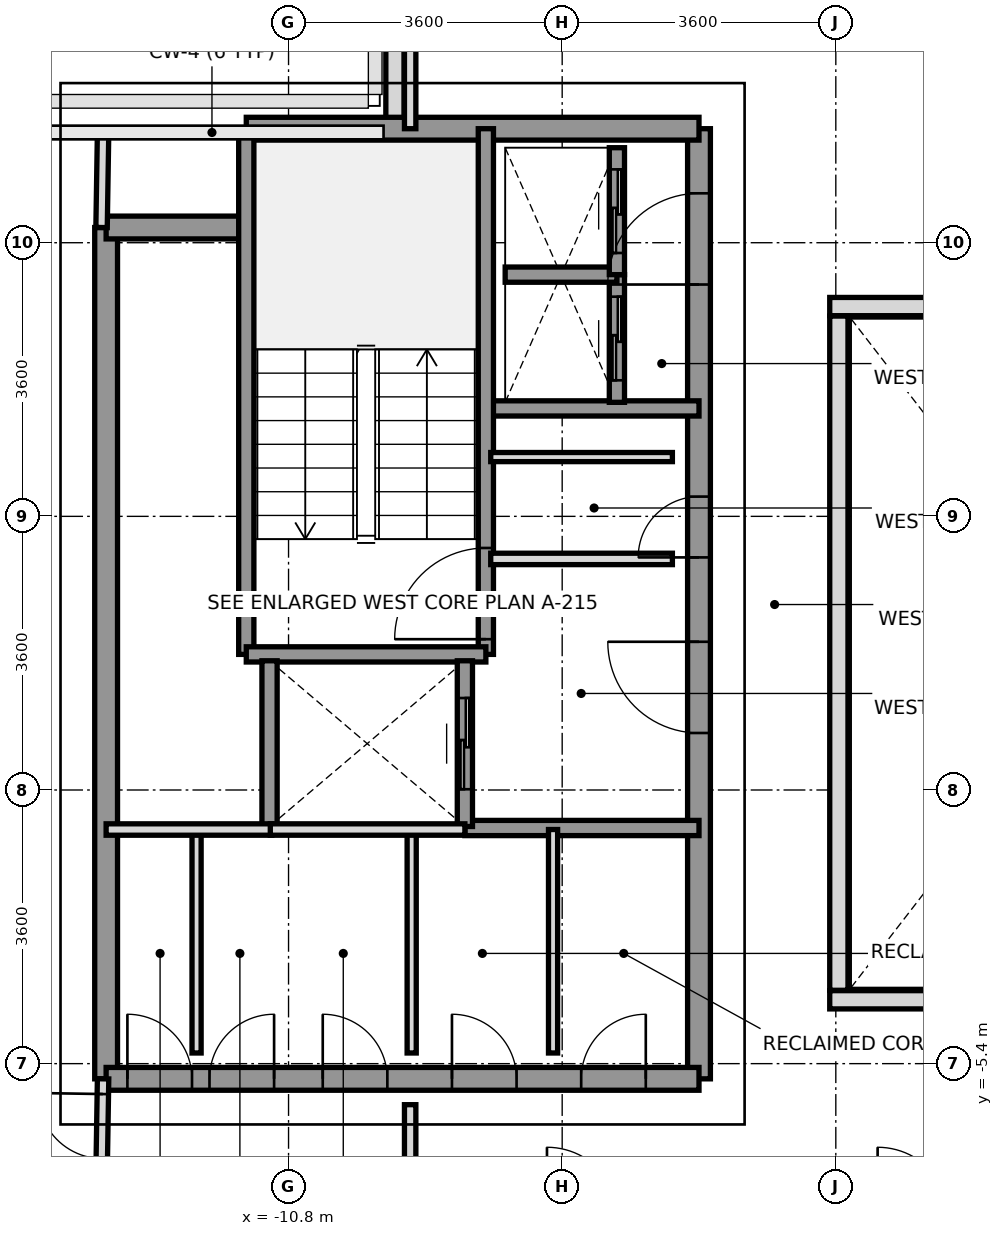
"""IFC4 building model, lengths in metres.
Left out: names, types, materials, properties, quantities, classifications, styles, units other than length and angle.
Written with IfcOpenShell. Run it as: python <this file> out.ifc"""

import sys

from ifc_helpers import new_model, si_unit, direction, frame, frame_2d, origin, place, context, subcontext, project, spatial, rectangle, extrude, source, transform, mapped, element, fill, save


model = new_model("IFC4")
c1 = context("Model", 3, precision=1e-05, world=origin(), true_north=direction((0.0, 1.0)))
c2 = subcontext(c1, "Body", "Model", "MODEL_VIEW")
j1 = project(units=[si_unit("LENGTHUNIT", "METRE"), si_unit("PLANEANGLEUNIT", "RADIAN")], contexts=[c1])
p1 = place(None, origin())
s1 = spatial("IfcSite", under=j1, at=p1, CompositionType="ELEMENT")
p2 = place(p1, origin())
s2 = spatial("IfcBuilding", under=s1, at=p2, CompositionType="ELEMENT")
p3 = place(p2, frame((0.0, 0.0, 230.0)))
s3 = spatial("IfcBuildingStorey", under=s2, at=p3, CompositionType="ELEMENT", Elevation=230.0)
p4 = place(p3, frame((-9.4, 6.953, 0.0), z_axis=(0.0, 0.0, 1.0), x_axis=(0.0, 1.0, 0.0)))
e1 = element("IfcWall", 1, at=p4, inside=s3, PredefinedType="PARAPET", context=c2, shape_type="SweptSolid", body=[
    extrude(rectangle(XDim=1.669, YDim=0.24, at=frame_2d((0.834, 0.0))), origin(), (0.0, 0.0, 1.0), 1.15),
])
p5 = place(p3, frame((-13.2, -5.6, 0.0), z_axis=(0.0, 0.0, 1.0), x_axis=(0.0, 1.0, 0.0)))
e2 = element("IfcWall", 2, at=p5, inside=s3, PredefinedType="SHEAR", context=c2, shape_type="SweptSolid", body=[
    extrude(rectangle(XDim=11.2, YDim=0.3, at=frame_2d((5.6, 0.0))), origin(), (0.0, 0.0, 1.0), 3.01),
])
p6 = place(p3, frame((-5.4, -5.6, 0.0), z_axis=(0.0, 0.0, 1.0), x_axis=(0.0, 1.0, 0.0)))
e3 = element("IfcWall", 3, at=p6, inside=s3, PredefinedType="SHEAR", context=c2, shape_type="SweptSolid", body=[
    extrude(rectangle(XDim=12.5, YDim=0.3, at=frame_2d((6.25, 0.0))), origin(), (0.0, 0.0, 1.0), 3.01),
])
p7 = place(p6, frame((4.55, 0.0, 0.0)))
e4 = element("IfcOpeningElement", 4, at=p7, cuts=e3, PredefinedType="OPENING", context=c2, shape_type="SweptSolid", body=[
    extrude(rectangle(XDim=1.2, YDim=2.2, at=frame_2d((0.6, 1.1))), frame((0.0, 0.16, 0.0), z_axis=(0.0, -1.0, 0.0), x_axis=(1.0, 0.0, 0.0)), (0.0, 0.0, 1.0), 0.32),
])
p8 = place(p6, frame((10.45, 0.0, 0.0)))
e5 = element("IfcOpeningElement", 5, at=p8, cuts=e3, PredefinedType="OPENING", context=c2, shape_type="SweptSolid", body=[
    extrude(rectangle(XDim=1.2, YDim=2.2, at=frame_2d((0.6, 1.1))), frame((0.0, 0.16, 0.0), z_axis=(0.0, -1.0, 0.0), x_axis=(1.0, 0.0, 0.0)), (0.0, 0.0, 1.0), 0.32),
])
p9 = place(p6, frame((6.86, 0.0, 0.0)))
e6 = element("IfcOpeningElement", 6, at=p9, cuts=e3, PredefinedType="OPENING", context=c2, shape_type="SweptSolid", body=[
    extrude(rectangle(XDim=0.8, YDim=2.1, at=frame_2d((0.4, 1.05))), frame((0.0, 0.16, 0.0), z_axis=(0.0, -1.0, 0.0), x_axis=(1.0, 0.0, 0.0)), (0.0, 0.0, 1.0), 0.32),
])
p10 = place(p3, frame((-11.356, 6.9, 0.0), z_axis=(0.0, 0.0, 1.0), x_axis=(1.0, 0.0, 0.0)))
e7 = element("IfcWall", 7, at=p10, inside=s3, PredefinedType="SHEAR", context=c2, shape_type="SweptSolid", body=[
    extrude(rectangle(XDim=5.956, YDim=0.3, at=frame_2d((2.978, 0.0))), origin(), (0.0, 0.0, 1.0), 3.01),
])
p11 = place(p3, frame((-13.2, 5.6, 0.0), z_axis=(0.0, 0.0, 1.0), x_axis=(1.0, 0.0, 0.0)))
e8 = element("IfcWall", 8, at=p11, inside=s3, PredefinedType="SHEAR", context=c2, shape_type="SweptSolid", body=[
    extrude(rectangle(XDim=1.844, YDim=0.3, at=frame_2d((0.922, 0.0))), origin(), (0.0, 0.0, 1.0), 3.01),
])
p12 = place(p3, frame((-13.2, -5.6, 0.0), z_axis=(0.0, 0.0, 1.0), x_axis=(1.0, 0.0, 0.0)))
e9 = element("IfcWall", 9, at=p12, inside=s3, PredefinedType="SHEAR", context=c2, shape_type="SweptSolid", body=[
    extrude(rectangle(XDim=7.8, YDim=0.3, at=frame_2d((3.9, 0.0))), origin(), (0.0, 0.0, 1.0), 3.01),
])
p13 = place(p12, frame((0.28, 0.0, 0.0)))
e10 = element("IfcOpeningElement", 10, at=p13, cuts=e9, PredefinedType="OPENING", context=c2, shape_type="SweptSolid", body=[
    extrude(rectangle(XDim=0.85, YDim=2.1, at=frame_2d((0.425, 1.05))), frame((0.0, 0.16, 0.0), z_axis=(0.0, -1.0, 0.0), x_axis=(1.0, 0.0, 0.0)), (0.0, 0.0, 1.0), 0.32),
])
p14 = place(p12, frame((1.36, 0.0, 0.0)))
e11 = element("IfcOpeningElement", 11, at=p14, cuts=e9, PredefinedType="OPENING", context=c2, shape_type="SweptSolid", body=[
    extrude(rectangle(XDim=0.85, YDim=2.1, at=frame_2d((0.425, 1.05))), frame((0.0, 0.16, 0.0), z_axis=(0.0, -1.0, 0.0), x_axis=(1.0, 0.0, 0.0)), (0.0, 0.0, 1.0), 0.32),
])
p15 = place(p12, frame((2.85, 0.0, 0.0)))
e12 = element("IfcOpeningElement", 12, at=p15, cuts=e9, PredefinedType="OPENING", context=c2, shape_type="SweptSolid", body=[
    extrude(rectangle(XDim=0.85, YDim=2.1, at=frame_2d((0.425, 1.05))), frame((0.0, 0.16, 0.0), z_axis=(0.0, -1.0, 0.0), x_axis=(1.0, 0.0, 0.0)), (0.0, 0.0, 1.0), 0.32),
])
p16 = place(p12, frame((4.55, 0.0, 0.0)))
e13 = element("IfcOpeningElement", 13, at=p16, cuts=e9, PredefinedType="OPENING", context=c2, shape_type="SweptSolid", body=[
    extrude(rectangle(XDim=0.85, YDim=2.1, at=frame_2d((0.425, 1.05))), frame((0.0, 0.16, 0.0), z_axis=(0.0, -1.0, 0.0), x_axis=(1.0, 0.0, 0.0)), (0.0, 0.0, 1.0), 0.32),
])
p17 = place(p12, frame((6.25, 0.0, 0.0)))
e14 = element("IfcOpeningElement", 14, at=p17, cuts=e9, PredefinedType="OPENING", context=c2, shape_type="SweptSolid", body=[
    extrude(rectangle(XDim=0.85, YDim=2.1, at=frame_2d((0.425, 1.05))), frame((0.0, 0.16, 0.0), z_axis=(0.0, -1.0, 0.0), x_axis=(1.0, 0.0, 0.0)), (0.0, 0.0, 1.0), 0.32),
])
p18 = place(p3, frame((-8.18, 3.22, 0.0), z_axis=(0.0, 0.0, 1.0), x_axis=(1.0, 0.0, 0.0)))
e15 = element("IfcWall", 15, at=p18, inside=s3, PredefinedType="SOLIDWALL", context=c2, shape_type="SweptSolid", body=[
    extrude(rectangle(XDim=2.78, YDim=0.2, at=frame_2d((1.39, 0.0))), origin(), (0.0, 0.0, 1.0), 3.01),
])
p19 = place(p3, frame((-8.48, -2.3, 0.0), z_axis=(0.0, 0.0, 1.0), x_axis=(1.0, 0.0, 0.0)))
e16 = element("IfcWall", 16, at=p19, inside=s3, PredefinedType="SOLIDWALL", context=c2, shape_type="SweptSolid", body=[
    extrude(rectangle(XDim=3.08, YDim=0.2, at=frame_2d((1.54, 0.0))), origin(), (0.0, 0.0, 1.0), 3.01),
])
p20 = place(p3, frame((-8.204, -0.016, 0.0), z_axis=(0.0, 0.0, 1.0), x_axis=(0.0, 1.0, 0.0)))
e17 = element("IfcWall", 17, at=p20, inside=s3, PredefinedType="SOLIDWALL", context=c2, shape_type="SweptSolid", body=[
    extrude(rectangle(XDim=6.916, YDim=0.2, at=frame_2d((3.458, 0.0))), origin(), (0.0, 0.0, 1.0), 3.01),
])
p21 = place(p20, frame((0.2, 0.0, 0.0)))
e18 = element("IfcOpeningElement", 18, at=p21, cuts=e17, PredefinedType="OPENING", context=c2, shape_type="SweptSolid", body=[
    extrude(rectangle(XDim=1.2, YDim=2.2, at=frame_2d((0.6, 1.1))), frame((0.0, 0.11, 0.0), z_axis=(0.0, -1.0, 0.0), x_axis=(1.0, 0.0, 0.0)), (0.0, 0.0, 1.0), 0.22),
])
p22 = place(p3, frame((-11.356, -0.016, 0.0), z_axis=(0.0, 0.0, 1.0), x_axis=(0.0, 1.0, 0.0)))
e19 = element("IfcWall", 19, at=p22, inside=s3, PredefinedType="SOLIDWALL", context=c2, shape_type="SweptSolid", body=[
    extrude(rectangle(XDim=6.916, YDim=0.2, at=frame_2d((3.458, 0.0))), origin(), (0.0, 0.0, 1.0), 3.01),
])
p23 = place(p3, frame((-11.356, -0.016, 0.0), z_axis=(0.0, 0.0, 1.0), x_axis=(1.0, 0.0, 0.0)))
e20 = element("IfcWall", 20, at=p23, inside=s3, PredefinedType="SOLIDWALL", context=c2, shape_type="SweptSolid", body=[
    extrude(rectangle(XDim=3.152, YDim=0.2, at=frame_2d((1.576, 0.0))), origin(), (0.0, 0.0, 1.0), 3.01),
])
p24 = place(p3, frame((-11.05, -2.28, 0.0), z_axis=(0.0, 0.0, 1.0), x_axis=(0.0, 1.0, 0.0)))
e21 = element("IfcWall", 21, at=p24, inside=s3, PredefinedType="SOLIDWALL", context=c2, shape_type="SweptSolid", body=[
    extrude(rectangle(XDim=2.18, YDim=0.2, at=frame_2d((1.09, 0.0))), origin(), (0.0, 0.0, 1.0), 3.01),
])
p25 = place(p3, frame((-8.48, -2.28, 0.0), z_axis=(0.0, 0.0, 1.0), x_axis=(0.0, 1.0, 0.0)))
e22 = element("IfcWall", 22, at=p25, inside=s3, PredefinedType="SOLIDWALL", context=c2, shape_type="SweptSolid", body=[
    extrude(rectangle(XDim=2.18, YDim=0.2, at=frame_2d((1.09, 0.0))), origin(), (0.0, 0.0, 1.0), 3.01),
])
p26 = place(p25, frame((0.49, 0.0, 0.0)))
e23 = element("IfcOpeningElement", 23, at=p26, cuts=e22, PredefinedType="OPENING", context=c2, shape_type="SweptSolid", body=[
    extrude(rectangle(XDim=1.2, YDim=2.2, at=frame_2d((0.6, 1.1))), frame((0.0, 0.11, 0.0), z_axis=(0.0, -1.0, 0.0), x_axis=(1.0, 0.0, 0.0)), (0.0, 0.0, 1.0), 0.22),
])
p27 = place(p3, frame((-6.48, 3.3, 0.0), z_axis=(0.0, 0.0, 1.0), x_axis=(0.0, 1.0, 0.0)))
e24 = element("IfcWall", 24, at=p27, inside=s3, PredefinedType="SOLIDWALL", context=c2, shape_type="SweptSolid", body=[
    extrude(rectangle(XDim=1.68, YDim=0.2, at=frame_2d((0.84, 0.0))), origin(), (0.0, 0.0, 1.0), 3.01),
])
p28 = place(p27, frame((0.29, 0.0, 0.0)))
e25 = element("IfcOpeningElement", 25, at=p28, cuts=e24, PredefinedType="OPENING", context=c2, shape_type="SweptSolid", body=[
    extrude(rectangle(XDim=1.1, YDim=2.2, at=frame_2d((0.55, 1.1))), frame((0.0, 0.11, 0.0), z_axis=(0.0, -1.0, 0.0), x_axis=(1.0, 0.0, 0.0)), (0.0, 0.0, 1.0), 0.22),
])
p29 = place(p3, frame((-7.95, 4.98, 0.0), z_axis=(0.0, 0.0, 1.0), x_axis=(1.0, 0.0, 0.0)))
e26 = element("IfcWall", 26, at=p29, inside=s3, PredefinedType="SOLIDWALL", context=c2, shape_type="SweptSolid", body=[
    extrude(rectangle(XDim=1.47, YDim=0.2, at=frame_2d((0.735, 0.0))), origin(), (0.0, 0.0, 1.0), 3.01),
])
p30 = place(p3, frame((-6.48, 4.98, 0.0), z_axis=(0.0, 0.0, 1.0), x_axis=(0.0, 1.0, 0.0)))
e27 = element("IfcWall", 27, at=p30, inside=s3, PredefinedType="SOLIDWALL", context=c2, shape_type="SweptSolid", body=[
    extrude(rectangle(XDim=1.67, YDim=0.2, at=frame_2d((0.835, 0.0))), origin(), (0.0, 0.0, 1.0), 3.01),
])
p31 = place(p30, frame((0.285, 0.0, 0.0)))
e28 = element("IfcOpeningElement", 28, at=p31, cuts=e27, PredefinedType="OPENING", context=c2, shape_type="SweptSolid", body=[
    extrude(rectangle(XDim=1.1, YDim=2.2, at=frame_2d((0.55, 1.1))), frame((0.0, 0.11, 0.0), z_axis=(0.0, -1.0, 0.0), x_axis=(1.0, 0.0, 0.0)), (0.0, 0.0, 1.0), 0.22),
])
p32 = place(p3, frame((-8.14, 1.24, 0.0), z_axis=(0.0, 0.0, 1.0), x_axis=(1.0, 0.0, 0.0)))
e29 = element("IfcWall", 29, at=p32, inside=s3, PredefinedType="PARTITIONING", context=c2, shape_type="SweptSolid", body=[
    extrude(rectangle(XDim=2.39, YDim=0.15, at=frame_2d((1.195, 0.0))), origin(), (0.0, 0.0, 1.0), 3.01),
])
p33 = place(p3, frame((-8.14, 2.58, 0.0), z_axis=(0.0, 0.0, 1.0), x_axis=(1.0, 0.0, 0.0)))
e30 = element("IfcWall", 30, at=p33, inside=s3, PredefinedType="PARTITIONING", context=c2, shape_type="SweptSolid", body=[
    extrude(rectangle(XDim=2.39, YDim=0.12, at=frame_2d((1.195, 0.0))), origin(), (0.0, 0.0, 1.0), 3.01),
])
p34 = place(p3, frame((-12.01, -5.26, 0.0), z_axis=(0.0, 0.0, 1.0), x_axis=(0.0, 1.0, 0.0)))
e31 = element("IfcWall", 31, at=p34, inside=s3, PredefinedType="PARTITIONING", context=c2, shape_type="SweptSolid", body=[
    extrude(rectangle(XDim=2.94, YDim=0.12, at=frame_2d((1.47, 0.0))), origin(), (0.0, 0.0, 1.0), 3.01),
])
p35 = place(p3, frame((-13.2, -2.32, 0.0), z_axis=(0.0, 0.0, 1.0), x_axis=(1.0, 0.0, 0.0)))
e32 = element("IfcWall", 32, at=p35, inside=s3, PredefinedType="PARTITIONING", context=c2, shape_type="SweptSolid", body=[
    extrude(rectangle(XDim=2.18, YDim=0.15, at=frame_2d((1.09, 0.0))), origin(), (0.0, 0.0, 1.0), 3.01),
])
for number, where, z_axis, x_axis in (
    (33, (-9.18, -5.26, 0.0), (0.0, 0.0, 1.0), (0.0, 1.0, 0.0)),
    (34, (-7.32, -5.26, 0.0), (0.0, 0.0, 1.0), (0.0, 1.0, 0.0)),
):
    element("IfcWall", number, at=place(p3, frame(where, z_axis=z_axis, x_axis=x_axis)), inside=s3, PredefinedType="PARTITIONING", context=c2, shape_type="SweptSolid", body=[
        extrude(rectangle(XDim=2.94, YDim=0.12, at=frame_2d((1.47, 0.0))), origin(), (0.0, 0.0, 1.0), 3.01),
    ])
p36 = place(p3, frame((-11.04, -2.32, 0.0), z_axis=(0.0, 0.0, 1.0), x_axis=(1.0, 0.0, 0.0)))
e35 = element("IfcWall", 35, at=p36, inside=s3, PredefinedType="PARTITIONING", context=c2, shape_type="SweptSolid", body=[
    extrude(rectangle(XDim=2.56, YDim=0.15, at=frame_2d((1.28, 0.0))), origin(), (0.0, 0.0, 1.0), 3.01),
])
p37 = place(p3, frame((-9.2, 6.9, 0.0), z_axis=(0.0, 0.0, 1.0), x_axis=(0.0, 1.0, 0.0)))
e36 = element("IfcWall", 36, at=p37, inside=s3, PredefinedType="PARTITIONING", context=c2, shape_type="SweptSolid", body=[
    extrude(rectangle(XDim=3.38, YDim=0.15, at=frame_2d((1.69, 0.0))), origin(), (0.0, 0.0, 1.0), 2.61),
])
p38 = place(p3, frame((-9.2, -10.28, 0.0), z_axis=(0.0, 0.0, 1.0), x_axis=(0.0, 1.0, 0.0)))
e37 = element("IfcWall", 37, at=p38, inside=s3, PredefinedType="PARTITIONING", context=c2, shape_type="SweptSolid", body=[
    extrude(rectangle(XDim=4.34, YDim=0.15, at=frame_2d((2.17, 0.0))), origin(), (0.0, 0.0, 1.0), 2.61),
])
p39 = place(p3, frame((-13.26, 5.6, 0.0), z_axis=(0.0, 0.0, 1.0), x_axis=(0.016013571389, 0.999871774545, 0.0)))
e38 = element("IfcWall", 38, at=p39, inside=s3, PredefinedType="PARTITIONING", context=c2, shape_type="SweptSolid", body=[
    extrude(rectangle(XDim=1.25, YDim=0.15, at=frame_2d((0.625, 0.0))), origin(), (0.0, 0.0, 1.0), 3.01),
])
p40 = place(p3, frame((-13.26, -6.85, 0.0), z_axis=(0.0, 0.0, 1.0), x_axis=(0.016013571389, 0.999871774545, 0.0)))
e39 = element("IfcWall", 39, at=p40, inside=s3, PredefinedType="PARTITIONING", context=c2, shape_type="SweptSolid", body=[
    extrude(rectangle(XDim=1.25, YDim=0.15, at=frame_2d((0.625, 0.0))), origin(), (0.0, 0.0, 1.0), 3.01),
])
p41 = place(p40, frame((0.2, 0.0, 0.0)))
e40 = element("IfcOpeningElement", 40, at=p41, cuts=e39, PredefinedType="OPENING", context=c2, shape_type="SweptSolid", body=[
    extrude(rectangle(XDim=0.85, YDim=2.1, at=frame_2d((0.425, 1.05))), frame((0.0, 0.085, 0.0), z_axis=(0.0, -1.0, 0.0), x_axis=(1.0, 0.0, 0.0)), (0.0, 0.0, 1.0), 0.17),
])
for number, where, z_axis, x_axis in (
    (41, (-3.68, -4.56, 0.0), (0.0, 0.0, 1.0), (1.0, 0.0, 0.0)),
    (42, (-3.68, 4.56, 0.0), (0.0, 0.0, 1.0), (1.0, 0.0, 0.0)),
):
    element("IfcWall", number, at=place(p3, frame(where, z_axis=z_axis, x_axis=x_axis)), inside=s3, PredefinedType="PARAPET", context=c2, shape_type="SweptSolid", body=[
        extrude(rectangle(XDim=7.36, YDim=0.24, at=frame_2d((3.68, 0.0))), origin(), (0.0, 0.0, 1.0), 1.15),
    ])
p42 = place(p3, frame((-3.56, -4.435, 0.0), z_axis=(0.0, 0.0, 1.0), x_axis=(0.0, 1.0, 0.0)))
e43 = element("IfcWall", 43, at=p42, inside=s3, PredefinedType="PARAPET", context=c2, shape_type="SweptSolid", body=[
    extrude(rectangle(XDim=8.87, YDim=0.24, at=frame_2d((4.435, 0.0))), origin(), (0.0, 0.0, 1.0), 1.15),
])
m1 = source(origin(), c2, "Body", "SweptSolid", [
    extrude(rectangle(XDim=1.2, YDim=2.2, at=frame_2d((0.6, 1.1))), frame((0.0, 0.025, 0.0), z_axis=(0.0, -1.0, 0.0), x_axis=(1.0, 0.0, 0.0)), (0.0, 0.0, 1.0), 0.05),
])
p43 = place(p21, origin())
e44 = element("IfcDoor", 44, at=p43, inside=s3, OperationType="SINGLE_SWING_LEFT", PredefinedType="DOOR", context=c2, shape_type="MappedRepresentation", body=[
    mapped(m1, transform((0.0, 0.0, 0.0), x_axis=(1.0, 0.0, 0.0), y_axis=(0.0, 1.0, 0.0), z_axis=(0.0, 0.0, 1.0), scale=1.0)),
])
fill(e18, e44)
p44 = place(p7, origin())
e45 = element("IfcDoor", 45, at=p44, inside=s3, OperationType="SINGLE_SWING_RIGHT", PredefinedType="DOOR", context=c2, shape_type="MappedRepresentation", body=[
    mapped(m1, transform((0.0, 0.0, 0.0), x_axis=(1.0, 0.0, 0.0), y_axis=(0.0, 1.0, 0.0), z_axis=(0.0, 0.0, 1.0), scale=1.0)),
])
fill(e4, e45)
p45 = place(p8, origin())
e46 = element("IfcDoor", 46, at=p45, inside=s3, OperationType="SINGLE_SWING_LEFT", PredefinedType="DOOR", context=c2, shape_type="MappedRepresentation", body=[
    mapped(m1, transform((0.0, 0.0, 0.0), x_axis=(1.0, 0.0, 0.0), y_axis=(0.0, 1.0, 0.0), z_axis=(0.0, 0.0, 1.0), scale=1.0)),
])
fill(e5, e46)
m2 = source(origin(), c2, "Body", "SweptSolid", [
    extrude(rectangle(XDim=0.8, YDim=2.1, at=frame_2d((0.4, 1.05))), frame((0.0, 0.025, 0.0), z_axis=(0.0, -1.0, 0.0), x_axis=(1.0, 0.0, 0.0)), (0.0, 0.0, 1.0), 0.05),
])
p46 = place(p9, origin())
e47 = element("IfcDoor", 47, at=p46, inside=s3, OperationType="SINGLE_SWING_LEFT", PredefinedType="DOOR", context=c2, shape_type="MappedRepresentation", body=[
    mapped(m2, transform((0.0, 0.0, 0.0), x_axis=(1.0, 0.0, 0.0), y_axis=(0.0, 1.0, 0.0), z_axis=(0.0, 0.0, 1.0), scale=1.0)),
])
fill(e6, e47)
m3 = source(origin(), c2, "Body", "SweptSolid", [
    extrude(rectangle(XDim=0.85, YDim=2.1, at=frame_2d((0.425, 1.05))), frame((0.0, 0.025, 0.0), z_axis=(0.0, -1.0, 0.0), x_axis=(1.0, 0.0, 0.0)), (0.0, 0.0, 1.0), 0.05),
])
p47 = place(p13, origin())
e48 = element("IfcDoor", 48, at=p47, inside=s3, OperationType="SINGLE_SWING_LEFT", PredefinedType="DOOR", context=c2, shape_type="MappedRepresentation", body=[
    mapped(m3, transform((0.0, 0.0, 0.0), x_axis=(1.0, 0.0, 0.0), y_axis=(0.0, 1.0, 0.0), z_axis=(0.0, 0.0, 1.0), scale=1.0)),
])
fill(e10, e48)
p48 = place(p14, origin())
e49 = element("IfcDoor", 49, at=p48, inside=s3, OperationType="SINGLE_SWING_RIGHT", PredefinedType="DOOR", context=c2, shape_type="MappedRepresentation", body=[
    mapped(m3, transform((0.0, 0.0, 0.0), x_axis=(1.0, 0.0, 0.0), y_axis=(0.0, 1.0, 0.0), z_axis=(0.0, 0.0, 1.0), scale=1.0)),
])
fill(e11, e49)
p49 = place(p15, origin())
e50 = element("IfcDoor", 50, at=p49, inside=s3, OperationType="SINGLE_SWING_LEFT", PredefinedType="DOOR", context=c2, shape_type="MappedRepresentation", body=[
    mapped(m3, transform((0.0, 0.0, 0.0), x_axis=(1.0, 0.0, 0.0), y_axis=(0.0, 1.0, 0.0), z_axis=(0.0, 0.0, 1.0), scale=1.0)),
])
fill(e12, e50)
p50 = place(p16, origin())
e51 = element("IfcDoor", 51, at=p50, inside=s3, OperationType="SINGLE_SWING_LEFT", PredefinedType="DOOR", context=c2, shape_type="MappedRepresentation", body=[
    mapped(m3, transform((0.0, 0.0, 0.0), x_axis=(1.0, 0.0, 0.0), y_axis=(0.0, 1.0, 0.0), z_axis=(0.0, 0.0, 1.0), scale=1.0)),
])
fill(e13, e51)
p51 = place(p17, origin())
e52 = element("IfcDoor", 52, at=p51, inside=s3, OperationType="SINGLE_SWING_RIGHT", PredefinedType="DOOR", context=c2, shape_type="MappedRepresentation", body=[
    mapped(m3, transform((0.0, 0.0, 0.0), x_axis=(1.0, 0.0, 0.0), y_axis=(0.0, 1.0, 0.0), z_axis=(0.0, 0.0, 1.0), scale=1.0)),
])
fill(e14, e52)
p52 = place(p26, origin())
e53 = element("IfcDoor", 53, at=p52, inside=s3, OperationType="SLIDING_TO_RIGHT", PredefinedType="DOOR", context=c2, shape_type="MappedRepresentation", body=[
    mapped(m1, transform((0.0, 0.0, 0.0), x_axis=(1.0, 0.0, 0.0), y_axis=(0.0, 1.0, 0.0), z_axis=(0.0, 0.0, 1.0), scale=1.0)),
])
fill(e23, e53)
m4 = source(origin(), c2, "Body", "SweptSolid", [
    extrude(rectangle(XDim=1.1, YDim=2.2, at=frame_2d((0.55, 1.1))), frame((0.0, 0.025, 0.0), z_axis=(0.0, -1.0, 0.0), x_axis=(1.0, 0.0, 0.0)), (0.0, 0.0, 1.0), 0.05),
])
p53 = place(p28, origin())
e54 = element("IfcDoor", 54, at=p53, inside=s3, OperationType="SLIDING_TO_LEFT", PredefinedType="DOOR", context=c2, shape_type="MappedRepresentation", body=[
    mapped(m4, transform((0.0, 0.0, 0.0), x_axis=(1.0, 0.0, 0.0), y_axis=(0.0, 1.0, 0.0), z_axis=(0.0, 0.0, 1.0), scale=1.0)),
])
fill(e25, e54)
p54 = place(p31, origin())
e55 = element("IfcDoor", 55, at=p54, inside=s3, OperationType="SLIDING_TO_LEFT", PredefinedType="DOOR", context=c2, shape_type="MappedRepresentation", body=[
    mapped(m4, transform((0.0, 0.0, 0.0), x_axis=(1.0, 0.0, 0.0), y_axis=(0.0, 1.0, 0.0), z_axis=(0.0, 0.0, 1.0), scale=1.0)),
])
fill(e28, e55)
p55 = place(p41, origin())
e56 = element("IfcDoor", 56, at=p55, inside=s3, OperationType="SINGLE_SWING_RIGHT", PredefinedType="DOOR", context=c2, shape_type="MappedRepresentation", body=[
    mapped(m3, transform((0.0, 0.0, 0.0), x_axis=(1.0, 0.0, 0.0), y_axis=(0.0, 1.0, 0.0), z_axis=(0.0, 0.0, 1.0), scale=1.0)),
])
fill(e40, e56)
save(model, sys.argv[1])
